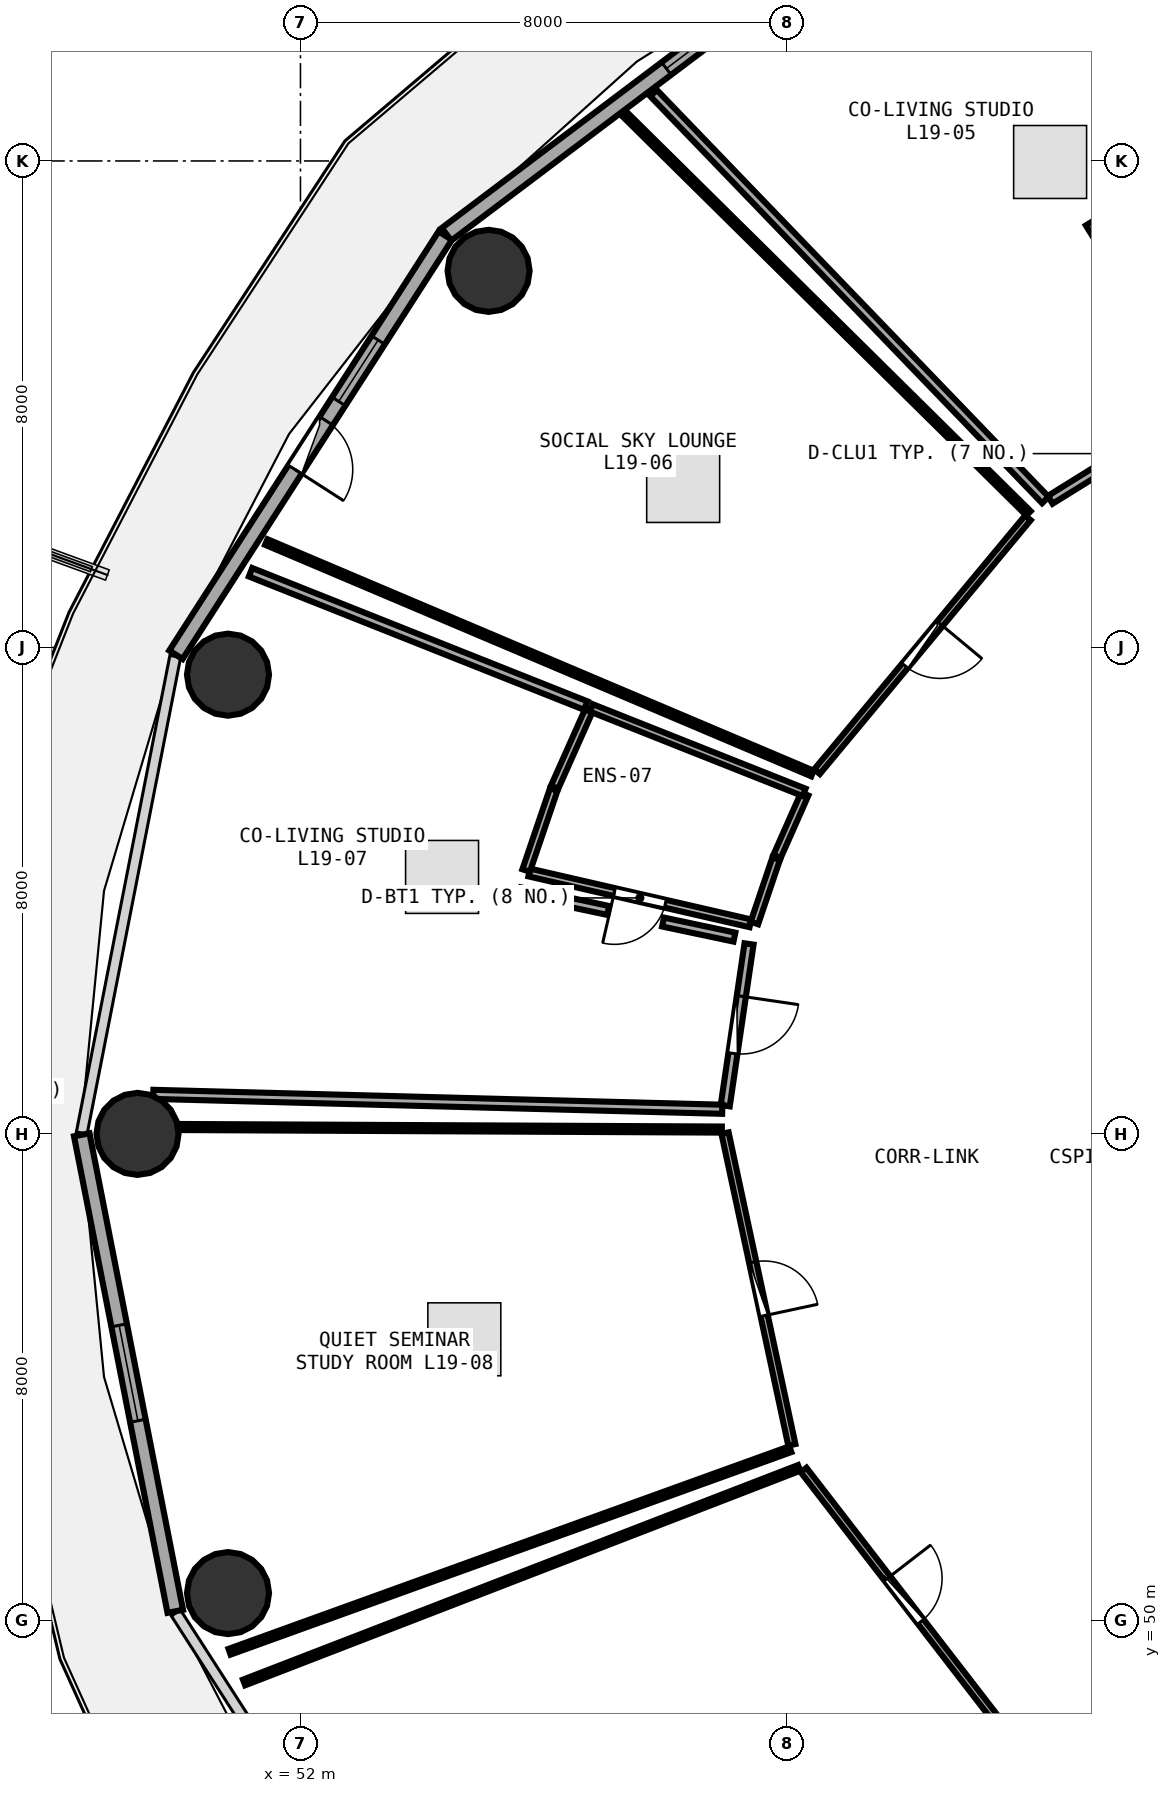
"""IFC4 building model, lengths in metres.
Left out: names, types, materials, properties, quantities, classifications, styles, units other than length and angle.
Written with IfcOpenShell. Run it as: python <this file> out.ifc"""

import sys

from ifc_helpers import new_model, si_unit, direction, frame, frame_2d, origin, origin_2d, place, context, subcontext, project, spatial, rectangle, circle, extrude, element, fill, save


model = new_model("IFC4")
c1 = context("Model", 3, precision=1e-05, world=origin(), true_north=direction((0.0, 1.0)))
c2 = subcontext(c1, "Body", "Model", "MODEL_VIEW")
j1 = project(units=[si_unit("LENGTHUNIT", "METRE"), si_unit("PLANEANGLEUNIT", "RADIAN")], contexts=[c1])
p1 = place(None, origin())
s1 = spatial("IfcSite", under=j1, at=p1, CompositionType="ELEMENT")
p2 = place(p1, origin())
s2 = spatial("IfcBuilding", under=s1, at=p2, CompositionType="ELEMENT")
p3 = place(p2, frame((0.0, 0.0, 76.35)))
s3 = spatial("IfcBuildingStorey", under=s2, at=p3, CompositionType="ELEMENT", Elevation=76.35)
for number, where, z_axis, x_axis in (
    (1, (55.094, 72.193, 0.0), (0.0, 0.0, 1.0), (1.0, 0.0, 0.0)),
    (2, (50.808, 65.552, 0.0), (0.0, 0.0, 1.0), (1.0, 0.0, 0.0)),
    (3, (49.32, 58.0, 0.0), (0.0, 0.0, 1.0), (1.0, 0.0, 0.0)),
    (4, (50.808, 50.448, 0.0), (0.0, 0.0, 1.0), (1.0, 0.0, 0.0)),
):
    element("IfcColumn", number, at=place(p3, frame(where, z_axis=z_axis, x_axis=x_axis)), inside=s3, PredefinedType="COLUMN", context=c2, shape_type="SweptSolid", body=[
        extrude(circle(Radius=0.675, at=origin_2d()), origin(), (0.0, 0.0, 1.0), 3.75),
    ])
p4 = place(p3, frame((61.188, 77.91, 0.0), z_axis=(0.0, 0.0, 1.0), x_axis=(-0.798501507879, -0.601992808857, 0.0)))
e5 = element("IfcWall", 5, at=p4, inside=s3, PredefinedType="SOLIDWALL", context=c2, shape_type="SweptSolid", body=[
    extrude(rectangle(XDim=8.499, YDim=0.26, at=frame_2d((4.25, 0.0))), origin(), (0.0, 0.0, 1.0), 3.475),
])
p5 = place(p4, frame((2.37, 0.0, 0.85)))
e6 = element("IfcOpeningElement", 6, at=p5, cuts=e5, PredefinedType="OPENING", context=c2, shape_type="SweptSolid", body=[
    extrude(rectangle(XDim=1.6, YDim=1.45, at=frame_2d((0.8, 0.725))), frame((0.0, 0.14, 0.0), z_axis=(0.0, -1.0, 0.0), x_axis=(1.0, 0.0, 0.0)), (0.0, 0.0, 1.0), 0.28),
])
p6 = place(p3, frame((54.381, 72.771, 0.0), z_axis=(0.0, 0.0, 1.0), x_axis=(-0.540620528459, -0.841266571432, 0.0)))
e7 = element("IfcWall", 7, at=p6, inside=s3, PredefinedType="SOLIDWALL", context=c2, shape_type="SweptSolid", body=[
    extrude(rectangle(XDim=8.193, YDim=0.26, at=frame_2d((4.096, 0.0))), origin(), (0.0, 0.0, 1.0), 3.475),
])
p7 = place(p6, frame((3.621, 0.0, 0.0)))
e8 = element("IfcOpeningElement", 8, at=p7, cuts=e7, PredefinedType="OPENING", context=c2, shape_type="SweptSolid", body=[
    extrude(rectangle(XDim=0.95, YDim=2.1, at=frame_2d((0.475, 1.05))), frame((0.0, 0.14, 0.0), z_axis=(0.0, -1.0, 0.0), x_axis=(1.0, 0.0, 0.0)), (0.0, 0.0, 1.0), 0.28),
])
p8 = place(p6, frame((2.041, 0.0, 0.85)))
e9 = element("IfcOpeningElement", 9, at=p8, cuts=e7, PredefinedType="OPENING", context=c2, shape_type="SweptSolid", body=[
    extrude(rectangle(XDim=1.2, YDim=1.45, at=frame_2d((0.6, 0.725))), frame((0.0, 0.14, 0.0), z_axis=(0.0, -1.0, 0.0), x_axis=(1.0, 0.0, 0.0)), (0.0, 0.0, 1.0), 0.28),
])
p9 = place(p3, frame((48.403, 57.985, 0.0), z_axis=(0.0, 0.0, 1.0), x_axis=(0.192581843632, -0.981280914674, 0.0)))
e10 = element("IfcWall", 10, at=p9, inside=s3, PredefinedType="SOLIDWALL", context=c2, shape_type="SweptSolid", body=[
    extrude(rectangle(XDim=7.987, YDim=0.26, at=frame_2d((3.993, 0.0))), origin(), (0.0, 0.0, 1.0), 3.475),
])
p10 = place(p9, frame((3.193, 0.0, 0.85)))
e11 = element("IfcOpeningElement", 11, at=p10, cuts=e10, PredefinedType="OPENING", context=c2, shape_type="SweptSolid", body=[
    extrude(rectangle(XDim=1.6, YDim=1.45, at=frame_2d((0.8, 0.725))), frame((0.0, 0.14, 0.0), z_axis=(0.0, -1.0, 0.0), x_axis=(1.0, 0.0, 0.0)), (0.0, 0.0, 1.0), 0.28),
])
p11 = place(p3, frame((66.779, 69.947, 0.0), z_axis=(0.0, 0.0, 1.0), x_axis=(-0.849569495091, -0.527476703761, 0.0)))
e12 = element("IfcWall", 12, at=p11, inside=s3, PredefinedType="PARTITIONING", context=c2, shape_type="SweptSolid", body=[
    extrude(rectangle(XDim=2.883, YDim=0.15, at=frame_2d((1.441, 0.0))), origin(), (0.0, 0.0, 1.0), 2.925),
])
p12 = place(p11, frame((0.966, 0.0, 0.0)))
e13 = element("IfcOpeningElement", 13, at=p12, cuts=e12, PredefinedType="OPENING", context=c2, shape_type="SweptSolid", body=[
    extrude(rectangle(XDim=0.95, YDim=2.08, at=frame_2d((0.475, 1.04))), frame((0.0, 0.085, 0.0), z_axis=(0.0, -1.0, 0.0), x_axis=(1.0, 0.0, 0.0)), (0.0, 0.0, 1.0), 0.17),
])
p13 = place(p3, frame((63.964, 68.131, 0.0), z_axis=(0.0, 0.0, 1.0), x_axis=(-0.639104047727, -0.769120287198, 0.0)))
e14 = element("IfcWall", 14, at=p13, inside=s3, PredefinedType="PARTITIONING", context=c2, shape_type="SweptSolid", body=[
    extrude(rectangle(XDim=5.427, YDim=0.12, at=frame_2d((2.713, 0.0))), origin(), (0.0, 0.0, 1.0), 2.925),
])
p14 = place(p13, frame((2.263, 0.0, 0.0)))
e15 = element("IfcOpeningElement", 15, at=p14, cuts=e14, PredefinedType="OPENING", context=c2, shape_type="SweptSolid", body=[
    extrude(rectangle(XDim=0.9, YDim=2.08, at=frame_2d((0.45, 1.04))), frame((0.0, 0.07, 0.0), z_axis=(0.0, -1.0, 0.0), x_axis=(1.0, 0.0, 0.0)), (0.0, 0.0, 1.0), 0.14),
])
p15 = place(p3, frame((59.4, 61.462, 0.0), z_axis=(0.0, 0.0, 1.0), x_axis=(-0.974573904169, 0.224066296689, 0.0)))
e16 = element("IfcWall", 16, at=p15, inside=s3, PredefinedType="PLUMBINGWALL", context=c2, shape_type="SweptSolid", body=[
    extrude(rectangle(XDim=3.732, YDim=0.13, at=frame_2d((1.866, 0.0))), origin(), (0.0, 0.0, 1.0), 3.175),
])
p16 = place(p15, frame((1.436, 0.0, 0.0)))
e17 = element("IfcOpeningElement", 17, at=p16, cuts=e16, PredefinedType="OPENING", context=c2, shape_type="SweptSolid", body=[
    extrude(rectangle(XDim=0.86, YDim=2.05, at=frame_2d((0.43, 1.025))), frame((0.0, 0.075, 0.0), z_axis=(0.0, -1.0, 0.0), x_axis=(1.0, 0.0, 0.0)), (0.0, 0.0, 1.0), 0.15),
])
p17 = place(p3, frame((59.377, 61.124, 0.0), z_axis=(0.0, 0.0, 1.0), x_axis=(-0.145640373191, -0.989337597434, 0.0)))
e18 = element("IfcWall", 18, at=p17, inside=s3, PredefinedType="PARTITIONING", context=c2, shape_type="SweptSolid", body=[
    extrude(rectangle(XDim=2.689, YDim=0.15, at=frame_2d((1.344, 0.0))), origin(), (0.0, 0.0, 1.0), 3.48),
])
p18 = place(p17, frame((0.869, 0.0, 0.0)))
e19 = element("IfcOpeningElement", 19, at=p18, cuts=e18, PredefinedType="OPENING", context=c2, shape_type="SweptSolid", body=[
    extrude(rectangle(XDim=0.95, YDim=2.08, at=frame_2d((0.475, 1.04))), frame((0.0, 0.085, 0.0), z_axis=(0.0, -1.0, 0.0), x_axis=(1.0, 0.0, 0.0)), (0.0, 0.0, 1.0), 0.17),
])
p19 = place(p3, frame((58.983, 58.012, 0.0), z_axis=(0.0, 0.0, 1.0), x_axis=(0.209586341226, -0.977790143933, 0.0)))
e20 = element("IfcWall", 20, at=p19, inside=s3, PredefinedType="PARTITIONING", context=c2, shape_type="SweptSolid", body=[
    extrude(rectangle(XDim=5.242, YDim=0.12, at=frame_2d((2.621, 0.0))), origin(), (0.0, 0.0, 1.0), 2.925),
])
p20 = place(p19, frame((2.171, 0.0, 0.0)))
e21 = element("IfcOpeningElement", 21, at=p20, cuts=e20, PredefinedType="OPENING", context=c2, shape_type="SweptSolid", body=[
    extrude(rectangle(XDim=0.9, YDim=2.08, at=frame_2d((0.45, 1.04))), frame((0.0, 0.07, 0.0), z_axis=(0.0, -1.0, 0.0), x_axis=(1.0, 0.0, 0.0)), (0.0, 0.0, 1.0), 0.14),
])
p21 = place(p3, frame((60.275, 52.473, 0.0), z_axis=(0.0, 0.0, 1.0), x_axis=(0.611167326409, -0.791501420801, 0.0)))
e22 = element("IfcWall", 22, at=p21, inside=s3, PredefinedType="PARTITIONING", context=c2, shape_type="SweptSolid", body=[
    extrude(rectangle(XDim=5.407, YDim=0.12, at=frame_2d((2.704, 0.0))), origin(), (0.0, 0.0, 1.0), 2.925),
])
p22 = place(p21, frame((2.254, 0.0, 0.0)))
e23 = element("IfcOpeningElement", 23, at=p22, cuts=e22, PredefinedType="OPENING", context=c2, shape_type="SweptSolid", body=[
    extrude(rectangle(XDim=0.9, YDim=2.08, at=frame_2d((0.45, 1.04))), frame((0.0, 0.07, 0.0), z_axis=(0.0, -1.0, 0.0), x_axis=(1.0, 0.0, 0.0)), (0.0, 0.0, 1.0), 0.14),
])
p23 = place(p3, frame((64.251, 68.424, 0.0), z_axis=(0.0, 0.0, 1.0), x_axis=(-0.693645221886, 0.720316809574, 0.0)))
e24 = element("IfcWall", 24, at=p23, inside=s3, PredefinedType="PARTITIONING", context=c2, shape_type="SweptSolid", body=[
    extrude(rectangle(XDim=9.291, YDim=0.15, at=frame_2d((4.646, 0.0))), origin(), (0.0, 0.0, 1.0), 2.975),
])
p24 = place(p3, frame((64.981, 72.979, 0.0), z_axis=(0.0, 0.0, 1.0), x_axis=(0.524609403226, -0.851343041345, 0.0)))
e25 = element("IfcWall", 25, at=p24, inside=s3, PredefinedType="PARTITIONING", context=c2, shape_type="SweptSolid", body=[
    extrude(rectangle(XDim=1.33, YDim=0.15, at=frame_2d((0.665, 0.0))), origin(), (0.0, 0.0, 1.0), 3.175),
])
p25 = place(p3, frame((60.42, 63.927, 0.0), z_axis=(0.0, 0.0, 1.0), x_axis=(-0.920723225206, 0.390216276654, 0.0)))
e26 = element("IfcWall", 26, at=p25, inside=s3, PredefinedType="PARTITIONING", context=c2, shape_type="SweptSolid", body=[
    extrude(rectangle(XDim=9.756, YDim=0.1, at=frame_2d((4.878, 0.0))), origin(), (0.0, 0.0, 1.0), 2.925),
])
p26 = place(p3, frame((57.344, 74.756, 0.0), z_axis=(0.0, 0.0, 1.0), x_axis=(0.711285789258, -0.702902927864, 0.0)))
e27 = element("IfcWall", 27, at=p26, inside=s3, PredefinedType="PARTITIONING", context=c2, shape_type="SweptSolid", body=[
    extrude(rectangle(XDim=9.32, YDim=0.1, at=frame_2d((4.66, 0.0))), origin(), (0.0, 0.0, 1.0), 2.975),
])
p27 = place(p3, frame((60.294, 63.591, 0.0), z_axis=(0.0, 0.0, 1.0), x_axis=(-0.40547338745, -0.914106849372, 0.0)))
e28 = element("IfcWall", 28, at=p27, inside=s3, PredefinedType="PLUMBINGWALL", context=c2, shape_type="SweptSolid", body=[
    extrude(rectangle(XDim=1.124, YDim=0.13, at=frame_2d((0.562, 0.0))), origin(), (0.0, 0.0, 1.0), 3.235),
])
p28 = place(p3, frame((59.823, 62.526, 0.0), z_axis=(0.0, 0.0, 1.0), x_axis=(-0.320617291593, -0.947208821925, 0.0)))
e29 = element("IfcWall", 29, at=p28, inside=s3, PredefinedType="PLUMBINGWALL", context=c2, shape_type="SweptSolid", body=[
    extrude(rectangle(XDim=1.117, YDim=0.13, at=frame_2d((0.559, 0.0))), origin(), (0.0, 0.0, 1.0), 3.48),
])
p29 = place(p3, frame((55.711, 62.331, 0.0), z_axis=(0.0, 0.0, 1.0), x_axis=(0.322409215332, 0.946600389747, 0.0)))
e30 = element("IfcWall", 30, at=p29, inside=s3, PredefinedType="PLUMBINGWALL", context=c2, shape_type="SweptSolid", body=[
    extrude(rectangle(XDim=1.408, YDim=0.13, at=frame_2d((0.704, 0.0))), origin(), (0.0, 0.0, 1.0), 3.48),
])
p30 = place(p3, frame((56.18, 63.701, 0.0), z_axis=(0.0, 0.0, 1.0), x_axis=(0.407258007738, 0.913313152831, 0.0)))
e31 = element("IfcWall", 31, at=p30, inside=s3, PredefinedType="PLUMBINGWALL", context=c2, shape_type="SweptSolid", body=[
    extrude(rectangle(XDim=1.416, YDim=0.13, at=frame_2d((0.708, 0.0))), origin(), (0.0, 0.0, 1.0), 3.175),
])
p31 = place(p3, frame((56.784, 65.006, 0.0), z_axis=(0.0, 0.0, 1.0), x_axis=(0.929457187308, -0.368929989242, 0.0)))
e32 = element("IfcWall", 32, at=p31, inside=s3, PredefinedType="PLUMBINGWALL", context=c2, shape_type="SweptSolid", body=[
    extrude(rectangle(XDim=3.765, YDim=0.13, at=frame_2d((1.883, 0.0))), origin(), (0.0, 0.0, 1.0), 3.175),
])
p32 = place(p3, frame((58.937, 58.405, 0.0), z_axis=(0.0, 0.0, 1.0), x_axis=(-0.99965775334, 0.026160584617, 0.0)))
e33 = element("IfcWall", 33, at=p32, inside=s3, PredefinedType="PARTITIONING", context=c2, shape_type="SweptSolid", body=[
    extrude(rectangle(XDim=9.36, YDim=0.15, at=frame_2d((4.68, 0.0))), origin(), (0.0, 0.0, 1.0), 2.975),
])
p33 = place(p3, frame((51.179, 67.236, 0.0), z_axis=(0.0, 0.0, 1.0), x_axis=(0.929212756669, -0.369545197294, 0.0)))
e34 = element("IfcWall", 34, at=p33, inside=s3, PredefinedType="PARTITIONING", context=c2, shape_type="SweptSolid", body=[
    extrude(rectangle(XDim=5.933, YDim=0.15, at=frame_2d((2.966, 0.0))), origin(), (0.0, 0.0, 1.0), 2.925),
])
p34 = place(p3, frame((55.613, 61.981, 0.0), z_axis=(0.0, 0.0, 1.0), x_axis=(0.978379851426, -0.206816020472, 0.0)))
e35 = element("IfcWall", 35, at=p34, inside=s3, PredefinedType="PARTITIONING", context=c2, shape_type="SweptSolid", body=[
    extrude(rectangle(XDim=1.481, YDim=0.15, at=frame_2d((0.741, 0.0))), origin(), (0.0, 0.0, 1.0), 3.175),
])
p35 = place(p3, frame((57.963, 61.484, 0.0), z_axis=(0.0, 0.0, 1.0), x_axis=(0.978361584069, -0.20690241859, 0.0)))
e36 = element("IfcWall", 36, at=p35, inside=s3, PredefinedType="PARTITIONING", context=c2, shape_type="SweptSolid", body=[
    extrude(rectangle(XDim=1.2, YDim=0.15, at=frame_2d((0.6, 0.0))), origin(), (0.0, 0.0, 1.0), 3.48),
])
p36 = place(p3, frame((60.056, 52.814, 0.0), z_axis=(0.0, 0.0, 1.0), x_axis=(-0.940543515483, -0.339673218671, 0.0)))
e37 = element("IfcWall", 37, at=p36, inside=s3, PredefinedType="PARTITIONING", context=c2, shape_type="SweptSolid", body=[
    extrude(rectangle(XDim=9.806, YDim=0.1, at=frame_2d((4.903, 0.0))), origin(), (0.0, 0.0, 1.0), 2.925),
])
p37 = place(p3, frame((50.011, 58.113, 0.0), z_axis=(0.0, 0.0, 1.0), x_axis=(0.999989173449, -0.004653276749, 0.0)))
e38 = element("IfcWall", 38, at=p37, inside=s3, PredefinedType="PARTITIONING", context=c2, shape_type="SweptSolid", body=[
    extrude(rectangle(XDim=8.919, YDim=0.1, at=frame_2d((4.459, 0.0))), origin(), (0.0, 0.0, 1.0), 2.925),
])
p38 = place(p3, frame((51.072, 48.979, 0.0), z_axis=(0.0, 0.0, 1.0), x_axis=(0.932757339165, 0.360504849112, 0.0)))
e39 = element("IfcWall", 39, at=p38, inside=s3, PredefinedType="PARTITIONING", context=c2, shape_type="SweptSolid", body=[
    extrude(rectangle(XDim=9.786, YDim=0.1, at=frame_2d((4.893, 0.0))), origin(), (0.0, 0.0, 1.0), 2.925),
])
p39 = place(p5, origin())
e40 = element("IfcWindow", 40, at=p39, inside=s3, PartitioningType="SINGLE_PANEL", PredefinedType="WINDOW", context=c2, shape_type="SweptSolid", body=[
    extrude(rectangle(XDim=1.6, YDim=1.45, at=frame_2d((0.8, 0.725))), frame((0.0, 0.03, 0.0), z_axis=(0.0, -1.0, 0.0), x_axis=(1.0, 0.0, 0.0)), (0.0, 0.0, 1.0), 0.06),
])
fill(e6, e40)
p40 = place(p7, frame((0.95, 0.0, 0.0), z_axis=(0.0, 0.0, 1.0), x_axis=(-1.0, 0.0, 0.0)))
e41 = element("IfcDoor", 41, at=p40, inside=s3, OperationType="SINGLE_SWING_LEFT", PredefinedType="DOOR", context=c2, shape_type="SweptSolid", body=[
    extrude(rectangle(XDim=0.95, YDim=2.1, at=frame_2d((0.475, 1.05))), frame((0.0, 0.025, 0.0), z_axis=(0.0, -1.0, 0.0), x_axis=(1.0, 0.0, 0.0)), (0.0, 0.0, 1.0), 0.05),
])
fill(e8, e41)
p41 = place(p8, origin())
e42 = element("IfcWindow", 42, at=p41, inside=s3, PartitioningType="SINGLE_PANEL", PredefinedType="WINDOW", context=c2, shape_type="SweptSolid", body=[
    extrude(rectangle(XDim=1.2, YDim=1.45, at=frame_2d((0.6, 0.725))), frame((0.0, 0.03, 0.0), z_axis=(0.0, -1.0, 0.0), x_axis=(1.0, 0.0, 0.0)), (0.0, 0.0, 1.0), 0.06),
])
fill(e9, e42)
p42 = place(p10, origin())
e43 = element("IfcWindow", 43, at=p42, inside=s3, PartitioningType="SINGLE_PANEL", PredefinedType="WINDOW", context=c2, shape_type="SweptSolid", body=[
    extrude(rectangle(XDim=1.6, YDim=1.45, at=frame_2d((0.8, 0.725))), frame((0.0, 0.03, 0.0), z_axis=(0.0, -1.0, 0.0), x_axis=(1.0, 0.0, 0.0)), (0.0, 0.0, 1.0), 0.06),
])
fill(e11, e43)
p43 = place(p14, origin())
e44 = element("IfcDoor", 44, at=p43, inside=s3, OperationType="SINGLE_SWING_LEFT", PredefinedType="DOOR", context=c2, shape_type="SweptSolid", body=[
    extrude(rectangle(XDim=0.9, YDim=2.08, at=frame_2d((0.45, 1.04))), frame((0.0, 0.025, 0.0), z_axis=(0.0, -1.0, 0.0), x_axis=(1.0, 0.0, 0.0)), (0.0, 0.0, 1.0), 0.05),
])
fill(e15, e44)
p44 = place(p16, origin())
e45 = element("IfcDoor", 45, at=p44, inside=s3, OperationType="SINGLE_SWING_RIGHT", PredefinedType="DOOR", context=c2, shape_type="SweptSolid", body=[
    extrude(rectangle(XDim=0.86, YDim=2.05, at=frame_2d((0.43, 1.025))), frame((0.0, 0.025, 0.0), z_axis=(0.0, -1.0, 0.0), x_axis=(1.0, 0.0, 0.0)), (0.0, 0.0, 1.0), 0.05),
])
fill(e17, e45)
p45 = place(p18, origin())
e46 = element("IfcDoor", 46, at=p45, inside=s3, OperationType="SINGLE_SWING_LEFT", PredefinedType="DOOR", context=c2, shape_type="SweptSolid", body=[
    extrude(rectangle(XDim=0.95, YDim=2.08, at=frame_2d((0.475, 1.04))), frame((0.0, 0.025, 0.0), z_axis=(0.0, -1.0, 0.0), x_axis=(1.0, 0.0, 0.0)), (0.0, 0.0, 1.0), 0.05),
])
fill(e19, e46)
p46 = place(p20, origin())
e47 = element("IfcDoor", 47, at=p46, inside=s3, OperationType="SINGLE_SWING_RIGHT", PredefinedType="DOOR", context=c2, shape_type="SweptSolid", body=[
    extrude(rectangle(XDim=0.9, YDim=2.08, at=frame_2d((0.45, 1.04))), frame((0.0, 0.025, 0.0), z_axis=(0.0, -1.0, 0.0), x_axis=(1.0, 0.0, 0.0)), (0.0, 0.0, 1.0), 0.05),
])
fill(e21, e47)
p47 = place(p22, origin())
e48 = element("IfcDoor", 48, at=p47, inside=s3, OperationType="SINGLE_SWING_LEFT", PredefinedType="DOOR", context=c2, shape_type="SweptSolid", body=[
    extrude(rectangle(XDim=0.9, YDim=2.08, at=frame_2d((0.45, 1.04))), frame((0.0, 0.025, 0.0), z_axis=(0.0, -1.0, 0.0), x_axis=(1.0, 0.0, 0.0)), (0.0, 0.0, 1.0), 0.05),
])
fill(e23, e48)
save(model, sys.argv[1])
